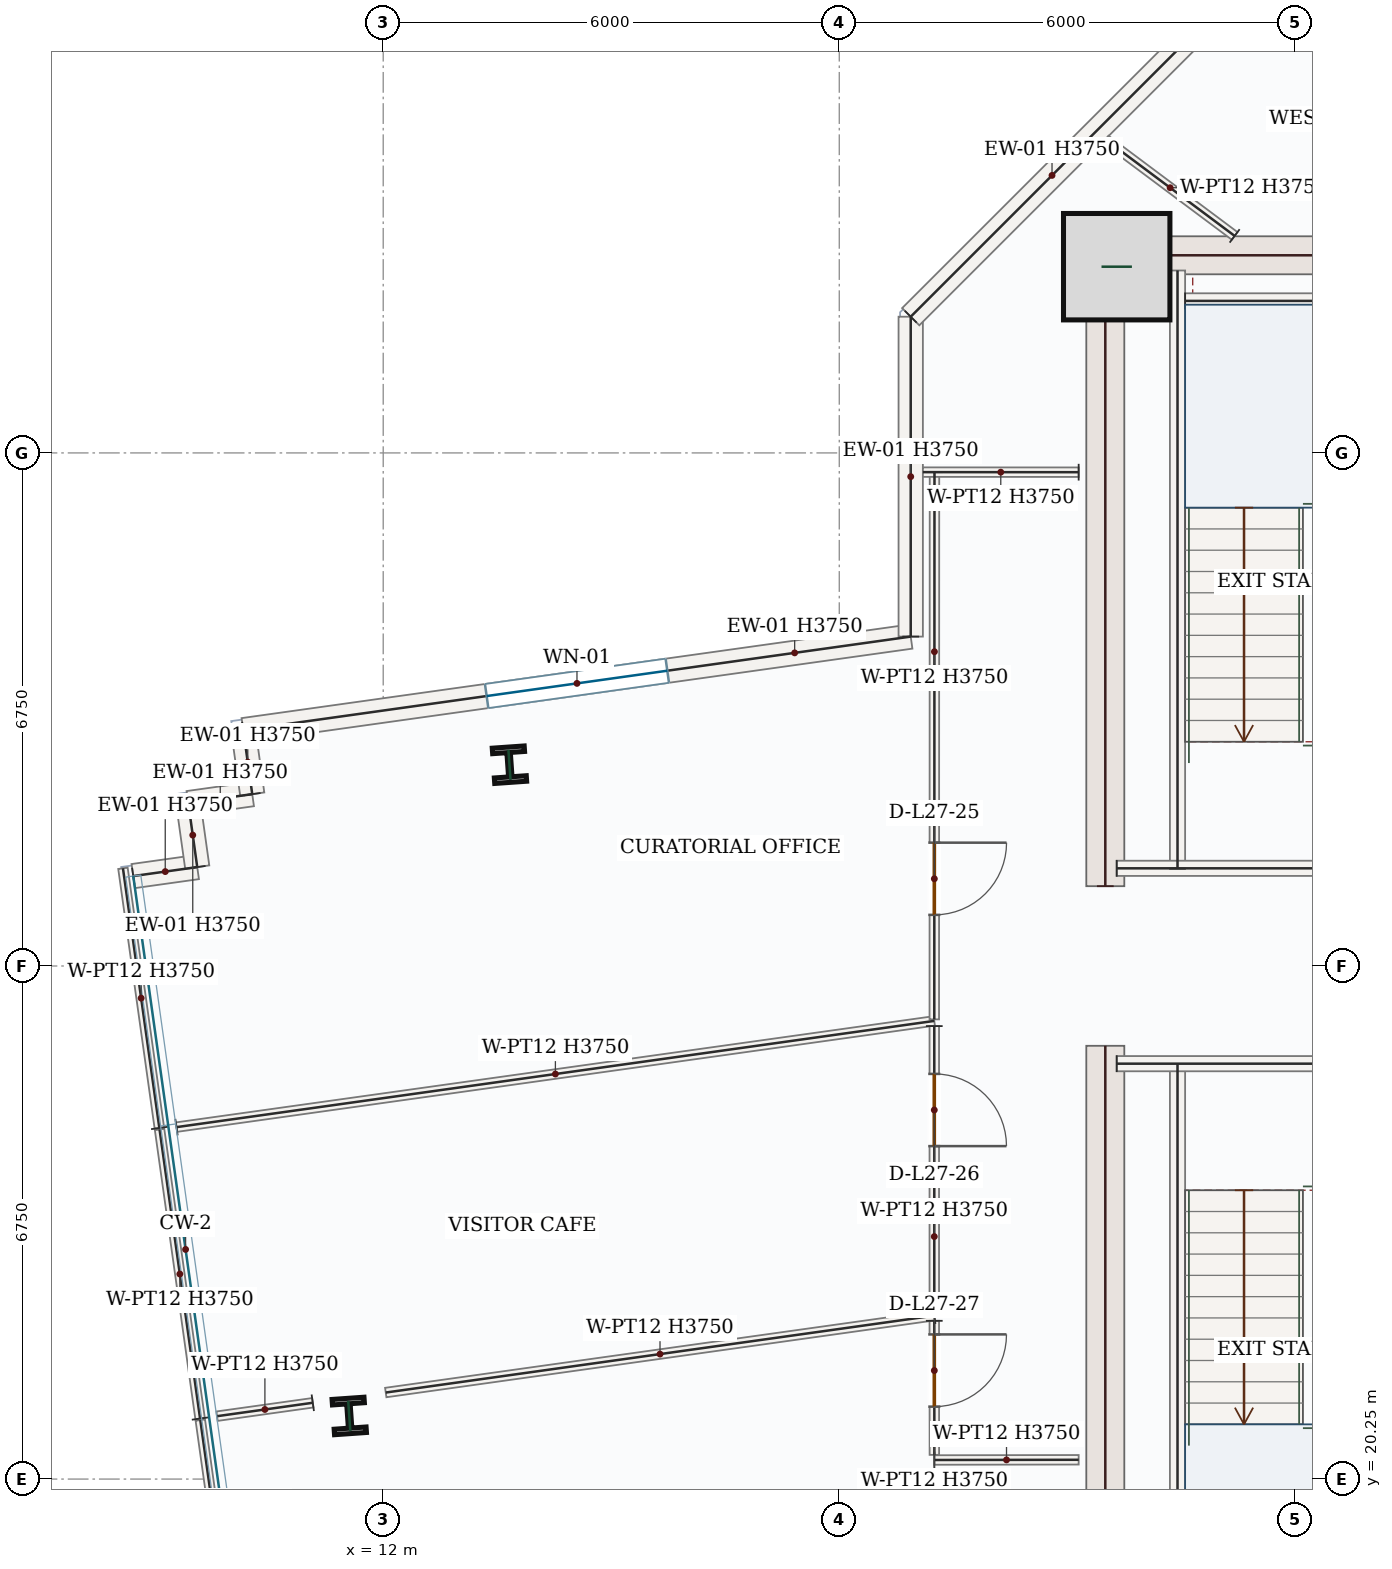
"""IFC4 building model, lengths in metres.
Left out: names, types, materials, properties, quantities, classifications, styles, units other than length and angle.
Written with IfcOpenShell. Run it as: python <this file> out.ifc"""

import sys

from ifc_helpers import new_model, si_unit, direction, frame, frame_2d, origin, origin_2d, place, context, subcontext, project, spatial, rectangle, i_section, extrude, source, transform, mapped, element, fill, save


model = new_model("IFC4")
c1 = context("Model", 3, precision=1e-05, world=origin(), true_north=direction((0.0, 1.0)))
c2 = subcontext(c1, "Body", "Model", "MODEL_VIEW")
j1 = project(units=[si_unit("LENGTHUNIT", "METRE"), si_unit("PLANEANGLEUNIT", "RADIAN")], contexts=[c1])
p1 = place(None, origin())
s1 = spatial("IfcSite", under=j1, at=p1, CompositionType="ELEMENT")
p2 = place(p1, origin())
s2 = spatial("IfcBuilding", under=s1, at=p2, CompositionType="ELEMENT")
p3 = place(p2, frame((0.0, 0.0, 121.5)))
s3 = spatial("IfcBuildingStorey", under=s2, at=p3, CompositionType="ELEMENT", Elevation=121.5)
m1 = source(origin(), c2, "Body", "SweptSolid", [
    extrude(rectangle(XDim=8.55, YDim=0.5, at=frame_2d((4.275, 0.0))), origin(), (0.0, 0.0, 1.0), 3.75),
])
for number, where, z_axis, x_axis in (
    (1, (21.5, 17.4, 0.0), (0.0, 0.0, 1.0), (0.0, 1.0, 0.0)),
    (2, (21.5, 28.05, 0.0), (0.0, 0.0, 1.0), (0.0, 1.0, 0.0)),
):
    element("IfcWall", number, at=place(p3, frame(where, z_axis=z_axis, x_axis=x_axis)), inside=s3, PredefinedType="SHEAR", context=c2, shape_type="MappedRepresentation", body=[
        mapped(m1, transform((0.0, 0.0, 0.0), x_axis=(1.0, 0.0, 0.0), y_axis=(0.0, 1.0, 0.0), z_axis=(0.0, 0.0, 1.0), scale=1.0)),
    ])
m2 = source(origin(), c2, "Body", "SweptSolid", [
    extrude(rectangle(XDim=7.0, YDim=0.5, at=frame_2d((3.5, 0.0))), origin(), (0.0, 0.0, 1.0), 3.75),
])
p4 = place(p3, frame((21.75, 36.35, 0.0), z_axis=(0.0, 0.0, 1.0), x_axis=(1.0, 0.0, 0.0)))
e3 = element("IfcWall", 3, at=p4, inside=s3, PredefinedType="SHEAR", context=c2, shape_type="MappedRepresentation", body=[
    mapped(m2, transform((0.0, 0.0, 0.0), x_axis=(1.0, 0.0, 0.0), y_axis=(0.0, 1.0, 0.0), z_axis=(0.0, 0.0, 1.0), scale=1.0)),
])
m3 = source(origin(), c2, "Body", "SweptSolid", [
    extrude(rectangle(XDim=1.4, YDim=1.4, at=origin_2d()), origin(), (0.0, 0.0, 1.0), 4.2),
])
p5 = place(p3, frame((21.65, 36.2, 0.0), z_axis=(0.0, 0.0, 1.0), x_axis=(1.0, 0.0, 0.0)))
e4 = element("IfcColumn", 4, at=p5, inside=s3, PredefinedType="COLUMN", context=c2, shape_type="MappedRepresentation", body=[
    mapped(m3, transform((0.0, 0.0, 0.0), x_axis=(1.0, 0.0, 0.0), y_axis=(0.0, 1.0, 0.0), z_axis=(0.0, 0.0, 1.0), scale=1.0)),
])
m4 = source(origin(), c2, "Body", "SweptSolid", [
    extrude(i_section(OverallWidth=0.421, OverallDepth=0.465, WebThickness=0.045, FlangeThickness=0.073, FilletRadius=0.018, at=origin_2d()), origin(), (0.0, 0.0, 1.0), 4.2),
])
for number, where, z_axis, x_axis in (
    (5, (13.661, 29.648, 0.0), (0.0, 0.0, 1.0), (0.998, 0.07, 0.0)),
    (6, (11.553, 21.08, 0.0), (0.0, 0.0, 1.0), (0.998, 0.07, 0.0)),
):
    element("IfcColumn", number, at=place(p3, frame(where, z_axis=z_axis, x_axis=x_axis)), inside=s3, PredefinedType="COLUMN", context=c2, shape_type="MappedRepresentation", body=[
        mapped(m4, transform((0.0, 0.0, 0.0), x_axis=(1.0, 0.0, 0.0), y_axis=(0.0, 1.0, 0.0), z_axis=(0.0, 0.0, 1.0), scale=1.0)),
    ])
m5 = source(origin(), c2, "Body", "SweptSolid", [
    extrude(rectangle(XDim=0.85, YDim=0.32, at=frame_2d((0.425, 0.0))), origin(), (0.0, 0.0, 1.0), 3.75),
])
for number, where, z_axis, x_axis in (
    (7, (8.711, 28.183, 0.0), (0.0, 0.0, 1.0), (0.99, 0.139, 0.0)),
    (8, (9.553, 28.301, 0.0), (0.0, 0.0, 1.0), (-0.139, 0.99, 0.0)),
    (9, (9.435, 29.143, 0.0), (0.0, 0.0, 1.0), (0.99, 0.139, 0.0)),
    (10, (10.277, 29.261, 0.0), (0.0, 0.0, 1.0), (-0.139, 0.99, 0.0)),
):
    element("IfcWall", number, at=place(p3, frame(where, z_axis=z_axis, x_axis=x_axis)), inside=s3, PredefinedType="SOLIDWALL", context=c2, shape_type="MappedRepresentation", body=[
        mapped(m5, transform((0.0, 0.0, 0.0), x_axis=(1.0, 0.0, 0.0), y_axis=(0.0, 1.0, 0.0), z_axis=(0.0, 0.0, 1.0), scale=1.0)),
    ])
p6 = place(p3, frame((10.159, 30.103, 0.0), z_axis=(0.0, 0.0, 1.0), x_axis=(0.990316171862, 0.138830399225, 0.0)))
e11 = element("IfcWall", 11, at=p6, inside=s3, PredefinedType="SOLIDWALL", context=c2, shape_type="SweptSolid", body=[
    extrude(rectangle(XDim=8.867, YDim=0.32, at=frame_2d((4.433, 0.0))), origin(), (0.0, 0.0, 1.0), 3.75),
])
p7 = place(p6, frame((3.233, 0.0, 0.85)))
e12 = element("IfcOpeningElement", 12, at=p7, cuts=e11, PredefinedType="OPENING", context=c2, shape_type="SweptSolid", body=[
    extrude(rectangle(XDim=2.4, YDim=1.8, at=frame_2d((1.2, 0.9))), frame((0.0, 0.17, 0.0), z_axis=(0.0, -1.0, 0.0), x_axis=(1.0, 0.0, 0.0)), (0.0, 0.0, 1.0), 0.34),
])
m6 = source(origin(), c2, "Body", "SweptSolid", [
    extrude(rectangle(XDim=4.208, YDim=0.32, at=frame_2d((2.104, 0.0))), origin(), (0.0, 0.0, 1.0), 3.75),
])
p8 = place(p3, frame((18.94, 31.333, 0.0), z_axis=(0.0, 0.0, 1.0), x_axis=(0.0, 1.0, 0.0)))
e13 = element("IfcWall", 13, at=p8, inside=s3, PredefinedType="SOLIDWALL", context=c2, shape_type="MappedRepresentation", body=[
    mapped(m6, transform((0.0, 0.0, 0.0), x_axis=(1.0, 0.0, 0.0), y_axis=(0.0, 1.0, 0.0), z_axis=(0.0, 0.0, 1.0), scale=1.0)),
])
m7 = source(origin(), c2, "Body", "SweptSolid", [
    extrude(rectangle(XDim=5.258, YDim=0.32, at=frame_2d((2.629, 0.0))), origin(), (0.0, 0.0, 1.0), 3.75),
])
p9 = place(p3, frame((18.94, 35.542, 0.0), z_axis=(0.0, 0.0, 1.0), x_axis=(0.707106781187, 0.707106781187, 0.0)))
e14 = element("IfcWall", 14, at=p9, inside=s3, PredefinedType="SOLIDWALL", context=c2, shape_type="MappedRepresentation", body=[
    mapped(m7, transform((0.0, 0.0, 0.0), x_axis=(1.0, 0.0, 0.0), y_axis=(0.0, 1.0, 0.0), z_axis=(0.0, 0.0, 1.0), scale=1.0)),
])
m8 = source(origin(), c2, "Body", "SweptSolid", [
    extrude(rectangle(XDim=7.87, YDim=0.2, at=frame_2d((3.935, 0.0))), origin(), (0.0, 0.0, 1.0), 3.75),
])
for number, where, z_axis, x_axis in (
    (15, (22.45, 17.85, 0.0), (0.0, 0.0, 1.0), (0.0, 1.0, 0.0)),
    (16, (22.45, 28.28, 0.0), (0.0, 0.0, 1.0), (0.0, 1.0, 0.0)),
):
    element("IfcWall", number, at=place(p3, frame(where, z_axis=z_axis, x_axis=x_axis)), inside=s3, PredefinedType="SOLIDWALL", context=c2, shape_type="MappedRepresentation", body=[
        mapped(m8, transform((0.0, 0.0, 0.0), x_axis=(1.0, 0.0, 0.0), y_axis=(0.0, 1.0, 0.0), z_axis=(0.0, 0.0, 1.0), scale=1.0)),
    ])
m9 = source(origin(), c2, "Body", "SweptSolid", [
    extrude(rectangle(XDim=4.25, YDim=0.2, at=frame_2d((2.125, 0.0))), origin(), (0.0, 0.0, 1.0), 3.75),
])
for number, where, z_axis, x_axis in (
    (17, (21.65, 25.715, 0.0), (0.0, 0.0, 1.0), (1.0, 0.0, 0.0)),
    (18, (21.65, 28.285, 0.0), (0.0, 0.0, 1.0), (1.0, 0.0, 0.0)),
):
    element("IfcWall", number, at=place(p3, frame(where, z_axis=z_axis, x_axis=x_axis)), inside=s3, PredefinedType="SOLIDWALL", context=c2, shape_type="MappedRepresentation", body=[
        mapped(m9, transform((0.0, 0.0, 0.0), x_axis=(1.0, 0.0, 0.0), y_axis=(0.0, 1.0, 0.0), z_axis=(0.0, 0.0, 1.0), scale=1.0)),
    ])
m10 = source(origin(), c2, "Body", "SweptSolid", [
    extrude(rectangle(XDim=3.25, YDim=0.2, at=frame_2d((1.625, 0.0))), origin(), (0.0, 0.0, 1.0), 3.75),
])
p10 = place(p3, frame((22.55, 35.75, 0.0), z_axis=(0.0, 0.0, 1.0), x_axis=(1.0, 0.0, 0.0)))
e19 = element("IfcWall", 19, at=p10, inside=s3, PredefinedType="SOLIDWALL", context=c2, shape_type="MappedRepresentation", body=[
    mapped(m10, transform((0.0, 0.0, 0.0), x_axis=(1.0, 0.0, 0.0), y_axis=(0.0, 1.0, 0.0), z_axis=(0.0, 0.0, 1.0), scale=1.0)),
])
m11 = source(origin(), c2, "Body", "SweptSolid", [
    extrude(rectangle(XDim=1.272, YDim=0.125, at=frame_2d((0.636, 0.0))), origin(), (0.0, 0.0, 1.0), 3.75),
])
p11 = place(p3, frame((11.073, 21.254, 0.0), z_axis=(0.0, 0.0, 1.0), x_axis=(-0.990325928558, -0.138760784176, 0.0)))
e20 = element("IfcWall", 20, at=p11, inside=s3, PredefinedType="PARTITIONING", context=c2, shape_type="MappedRepresentation", body=[
    mapped(m11, transform((0.0, 0.0, 0.0), x_axis=(1.0, 0.0, 0.0), y_axis=(0.0, 1.0, 0.0), z_axis=(0.0, 0.0, 1.0), scale=1.0)),
])
m12 = source(origin(), c2, "Body", "SweptSolid", [
    extrude(rectangle(XDim=3.84, YDim=0.125, at=frame_2d((1.92, 0.0))), origin(), (0.0, 0.0, 1.0), 3.75),
])
p12 = place(p3, frame((9.591, 21.046, 0.0), z_axis=(0.0, 0.0, 1.0), x_axis=(-0.138795007241, 0.990321132747, 0.0)))
e21 = element("IfcWall", 21, at=p12, inside=s3, PredefinedType="PARTITIONING", context=c2, shape_type="MappedRepresentation", body=[
    mapped(m12, transform((0.0, 0.0, 0.0), x_axis=(1.0, 0.0, 0.0), y_axis=(0.0, 1.0, 0.0), z_axis=(0.0, 0.0, 1.0), scale=1.0)),
])
m13 = source(origin(), c2, "Body", "SweptSolid", [
    extrude(rectangle(XDim=10.067, YDim=0.125, at=frame_2d((5.033, 0.0))), origin(), (0.0, 0.0, 1.0), 3.75),
])
p13 = place(p3, frame((9.281, 24.88, 0.0), z_axis=(0.0, 0.0, 1.0), x_axis=(0.990318089486, 0.138816719584, 0.0)))
e22 = element("IfcWall", 22, at=p13, inside=s3, PredefinedType="PARTITIONING", context=c2, shape_type="MappedRepresentation", body=[
    mapped(m13, transform((0.0, 0.0, 0.0), x_axis=(1.0, 0.0, 0.0), y_axis=(0.0, 1.0, 0.0), z_axis=(0.0, 0.0, 1.0), scale=1.0)),
])
p14 = place(p3, frame((19.25, 26.209, 0.0), z_axis=(0.0, 0.0, 1.0), x_axis=(0.0, -1.0, 0.0)))
e23 = element("IfcWall", 23, at=p14, inside=s3, PredefinedType="PARTITIONING", context=c2, shape_type="SweptSolid", body=[
    extrude(rectangle(XDim=3.809, YDim=0.125, at=frame_2d((1.905, 0.0))), origin(), (0.0, 0.0, 1.0), 3.75),
])
p15 = place(p14, frame((0.629, 0.0, 0.0)))
e24 = element("IfcOpeningElement", 24, at=p15, cuts=e23, PredefinedType="OPENING", context=c2, shape_type="SweptSolid", body=[
    extrude(rectangle(XDim=0.95, YDim=2.15, at=frame_2d((0.475, 1.075))), frame((0.0, 0.073, 0.0), z_axis=(0.0, -1.0, 0.0), x_axis=(1.0, 0.0, 0.0)), (0.0, 0.0, 1.0), 0.145),
])
m14 = source(origin(), c2, "Body", "SweptSolid", [
    extrude(rectangle(XDim=7.287, YDim=0.125, at=frame_2d((3.644, 0.0))), origin(), (0.0, 0.0, 1.0), 3.75),
])
p16 = place(p3, frame((19.25, 22.4, 0.0), z_axis=(0.0, 0.0, 1.0), x_axis=(-0.990314677425, -0.138841059045, 0.0)))
e25 = element("IfcWall", 25, at=p16, inside=s3, PredefinedType="PARTITIONING", context=c2, shape_type="MappedRepresentation", body=[
    mapped(m14, transform((0.0, 0.0, 0.0), x_axis=(1.0, 0.0, 0.0), y_axis=(0.0, 1.0, 0.0), z_axis=(0.0, 0.0, 1.0), scale=1.0)),
])
m15 = source(origin(), c2, "Body", "SweptSolid", [
    extrude(rectangle(XDim=2.119, YDim=0.125, at=frame_2d((1.059, 0.0))), origin(), (0.0, 0.0, 1.0), 3.75),
])
p17 = place(p3, frame((23.202, 36.605, 0.0), z_axis=(0.0, 0.0, 1.0), x_axis=(-0.801201403988, 0.598394777925, 0.0)))
e26 = element("IfcWall", 26, at=p17, inside=s3, PredefinedType="PARTITIONING", context=c2, shape_type="MappedRepresentation", body=[
    mapped(m15, transform((0.0, 0.0, 0.0), x_axis=(1.0, 0.0, 0.0), y_axis=(0.0, 1.0, 0.0), z_axis=(0.0, 0.0, 1.0), scale=1.0)),
])
p18 = place(p3, frame((19.253, 33.497, 0.0), z_axis=(0.0, 0.0, 1.0), x_axis=(-0.000373020422, -0.999999930428, 0.0)))
e27 = element("IfcWall", 27, at=p18, inside=s3, PredefinedType="PARTITIONING", context=c2, shape_type="SweptSolid", body=[
    extrude(rectangle(XDim=7.199, YDim=0.125, at=frame_2d((3.6, 0.0))), origin(), (0.0, 0.0, 1.0), 3.75),
])
p19 = place(p18, frame((4.875, 0.0, 0.0)))
e28 = element("IfcOpeningElement", 28, at=p19, cuts=e27, PredefinedType="OPENING", context=c2, shape_type="SweptSolid", body=[
    extrude(rectangle(XDim=0.95, YDim=2.15, at=frame_2d((0.475, 1.075))), frame((0.0, 0.073, 0.0), z_axis=(0.0, -1.0, 0.0), x_axis=(1.0, 0.0, 0.0)), (0.0, 0.0, 1.0), 0.145),
])
m16 = source(origin(), c2, "Body", "SweptSolid", [
    extrude(rectangle(XDim=3.45, YDim=0.125, at=frame_2d((1.725, 0.0))), origin(), (0.0, 0.0, 1.0), 3.75),
])
p20 = place(p3, frame((9.055, 24.869, 0.0), z_axis=(0.0, 0.0, 1.0), x_axis=(-0.13883522696, 0.990315495059, 0.0)))
e29 = element("IfcWall", 29, at=p20, inside=s3, PredefinedType="PARTITIONING", context=c2, shape_type="MappedRepresentation", body=[
    mapped(m16, transform((0.0, 0.0, 0.0), x_axis=(1.0, 0.0, 0.0), y_axis=(0.0, 1.0, 0.0), z_axis=(0.0, 0.0, 1.0), scale=1.0)),
])
m17 = source(origin(), c2, "Body", "SweptSolid", [
    extrude(rectangle(XDim=2.049, YDim=0.125, at=frame_2d((1.025, 0.0))), origin(), (0.0, 0.0, 1.0), 3.75),
])
p21 = place(p3, frame((21.149, 33.497, 0.0), z_axis=(0.0, 0.0, 1.0), x_axis=(-0.999999936133, 0.000357398119, 0.0)))
e30 = element("IfcWall", 30, at=p21, inside=s3, PredefinedType="PARTITIONING", context=c2, shape_type="MappedRepresentation", body=[
    mapped(m17, transform((0.0, 0.0, 0.0), x_axis=(1.0, 0.0, 0.0), y_axis=(0.0, 1.0, 0.0), z_axis=(0.0, 0.0, 1.0), scale=1.0)),
])
m18 = source(origin(), c2, "Body", "SweptSolid", [
    extrude(rectangle(XDim=1.898, YDim=0.125, at=frame_2d((0.949, 0.0))), origin(), (0.0, 0.0, 1.0), 3.75),
])
p22 = place(p3, frame((19.251, 20.501, 0.0), z_axis=(0.0, 0.0, 1.0), x_axis=(0.999998999442, 0.001414607638, 0.0)))
e31 = element("IfcWall", 31, at=p22, inside=s3, PredefinedType="PARTITIONING", context=c2, shape_type="MappedRepresentation", body=[
    mapped(m18, transform((0.0, 0.0, 0.0), x_axis=(1.0, 0.0, 0.0), y_axis=(0.0, 1.0, 0.0), z_axis=(0.0, 0.0, 1.0), scale=1.0)),
])
m19 = source(origin(), c2, "Body", "SweptSolid", [
    extrude(rectangle(XDim=2.83, YDim=0.125, at=frame_2d((1.415, 0.0))), origin(), (0.0, 0.0, 1.0), 3.75),
])
p23 = place(p3, frame((9.987, 18.224, 0.0), z_axis=(0.0, 0.0, 1.0), x_axis=(-0.138811993372, 0.990318751966, 0.0)))
e32 = element("IfcWall", 32, at=p23, inside=s3, PredefinedType="PARTITIONING", context=c2, shape_type="MappedRepresentation", body=[
    mapped(m19, transform((0.0, 0.0, 0.0), x_axis=(1.0, 0.0, 0.0), y_axis=(0.0, 1.0, 0.0), z_axis=(0.0, 0.0, 1.0), scale=1.0)),
])
p24 = place(p3, frame((19.25, 22.332, 0.0), z_axis=(0.0, 0.0, 1.0), x_axis=(0.00055378643, -0.99999984666, 0.0)))
e33 = element("IfcWall", 33, at=p24, inside=s3, PredefinedType="PARTITIONING", context=c2, shape_type="SweptSolid", body=[
    extrude(rectangle(XDim=1.763, YDim=0.125, at=frame_2d((0.882, 0.0))), origin(), (0.0, 0.0, 1.0), 3.75),
])
p25 = place(p24, frame((0.179, 0.0, 0.0)))
e34 = element("IfcOpeningElement", 34, at=p25, cuts=e33, PredefinedType="OPENING", context=c2, shape_type="SweptSolid", body=[
    extrude(rectangle(XDim=0.95, YDim=2.15, at=frame_2d((0.475, 1.075))), frame((0.0, 0.073, 0.0), z_axis=(0.0, -1.0, 0.0), x_axis=(1.0, 0.0, 0.0)), (0.0, 0.0, 1.0), 0.145),
])
m20 = source(origin(), c2, "Body", "SweptSolid", [
    extrude(rectangle(XDim=2.4, YDim=1.8, at=frame_2d((1.2, 0.9))), frame((0.0, 0.03, 0.0), z_axis=(0.0, -1.0, 0.0), x_axis=(1.0, 0.0, 0.0)), (0.0, 0.0, 1.0), 0.06),
])
p26 = place(p7, origin())
e35 = element("IfcWindow", 35, at=p26, inside=s3, PartitioningType="DOUBLE_PANEL_VERTICAL", PredefinedType="WINDOW", context=c2, shape_type="MappedRepresentation", body=[
    mapped(m20, transform((0.0, 0.0, 0.0), x_axis=(1.0, 0.0, 0.0), y_axis=(0.0, 1.0, 0.0), z_axis=(0.0, 0.0, 1.0), scale=1.0)),
])
fill(e12, e35)
m21 = source(origin(), c2, "Body", "SweptSolid", [
    extrude(rectangle(XDim=0.95, YDim=2.15, at=frame_2d((0.475, 1.075))), frame((0.0, 0.025, 0.0), z_axis=(0.0, -1.0, 0.0), x_axis=(1.0, 0.0, 0.0)), (0.0, 0.0, 1.0), 0.05),
])
p27 = place(p19, origin())
e36 = element("IfcDoor", 36, at=p27, inside=s3, OperationType="SINGLE_SWING_LEFT", PredefinedType="DOOR", context=c2, shape_type="MappedRepresentation", body=[
    mapped(m21, transform((0.0, 0.0, 0.0), x_axis=(1.0, 0.0, 0.0), y_axis=(0.0, 1.0, 0.0), z_axis=(0.0, 0.0, 1.0), scale=1.0)),
])
fill(e28, e36)
p28 = place(p15, origin())
e37 = element("IfcDoor", 37, at=p28, inside=s3, OperationType="SINGLE_SWING_RIGHT", PredefinedType="DOOR", context=c2, shape_type="MappedRepresentation", body=[
    mapped(m21, transform((0.0, 0.0, 0.0), x_axis=(1.0, 0.0, 0.0), y_axis=(0.0, 1.0, 0.0), z_axis=(0.0, 0.0, 1.0), scale=1.0)),
])
fill(e24, e37)
p29 = place(p25, origin())
e38 = element("IfcDoor", 38, at=p29, inside=s3, OperationType="SINGLE_SWING_LEFT", PredefinedType="DOOR", context=c2, shape_type="MappedRepresentation", body=[
    mapped(m21, transform((0.0, 0.0, 0.0), x_axis=(1.0, 0.0, 0.0), y_axis=(0.0, 1.0, 0.0), z_axis=(0.0, 0.0, 1.0), scale=1.0)),
])
fill(e34, e38)
save(model, sys.argv[1])
